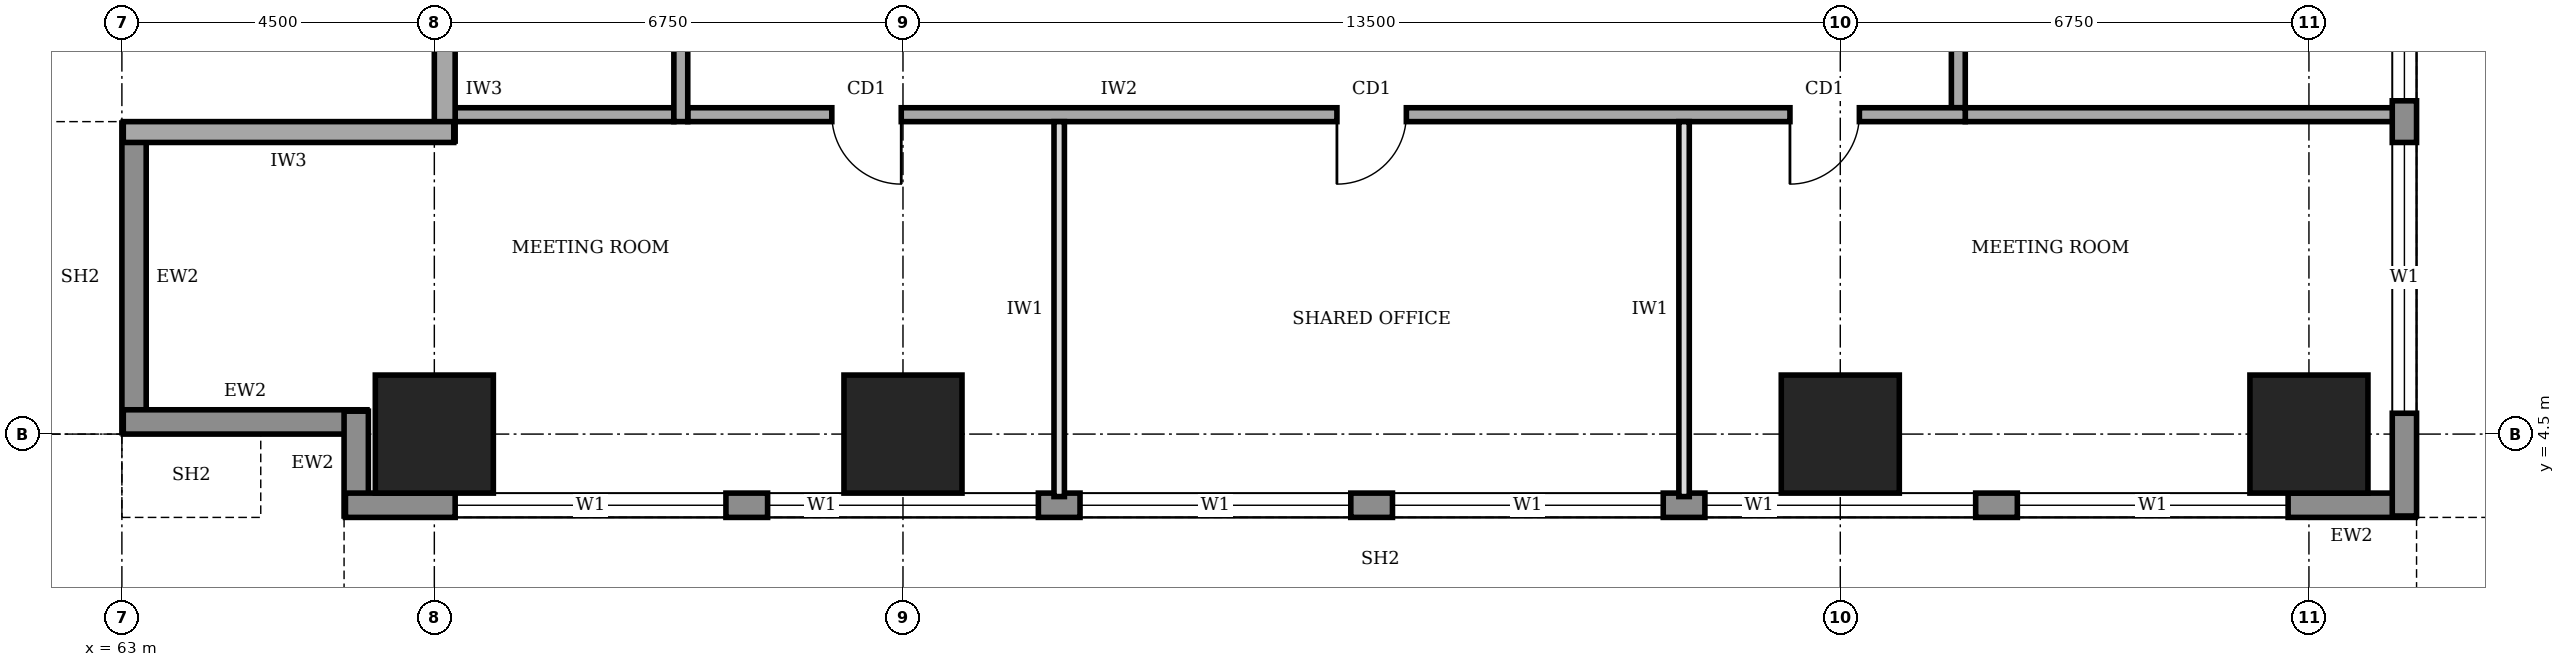
"""IFC4 building model, lengths in metres.
Left out: names, types, materials, properties, quantities, classifications, styles, units other than length and angle.
Written with IfcOpenShell. Run it as: python <this file> out.ifc"""

import sys

from ifc_helpers import new_model, si_unit, direction, frame, frame_2d, origin, origin_2d, place, context, subcontext, project, spatial, rectangle, extrude, element, fill, save


model = new_model("IFC4")
c1 = context("Model", 3, precision=1e-05, world=origin(), true_north=direction((0.0, 1.0)))
c2 = subcontext(c1, "Body", "Model", "MODEL_VIEW")
j1 = project(units=[si_unit("LENGTHUNIT", "METRE"), si_unit("PLANEANGLEUNIT", "RADIAN")], contexts=[c1])
p1 = place(None, origin())
s1 = spatial("IfcSite", under=j1, at=p1, CompositionType="ELEMENT")
p2 = place(p1, origin())
s2 = spatial("IfcBuilding", under=s1, at=p2, CompositionType="ELEMENT")
p3 = place(p2, frame((0.0, 0.0, 121.0)))
s3 = spatial("IfcBuildingStorey", under=s2, at=p3, CompositionType="ELEMENT", Elevation=121.0)
for number, where, z_axis, x_axis in (
    (1, (67.5, 4.5, 0.0), (0.0, 0.0, 1.0), (1.0, 0.0, 0.0)),
    (2, (74.25, 4.5, 0.0), (0.0, 0.0, 1.0), (1.0, 0.0, 0.0)),
    (3, (87.75, 4.5, 0.0), (0.0, 0.0, 1.0), (1.0, 0.0, 0.0)),
    (4, (94.5, 4.5, 0.0), (0.0, 0.0, 1.0), (1.0, 0.0, 0.0)),
):
    element("IfcColumn", number, at=place(p3, frame(where, z_axis=z_axis, x_axis=x_axis)), inside=s3, PredefinedType="COLUMN", context=c2, shape_type="SweptSolid", body=[
        extrude(rectangle(XDim=1.7, YDim=1.7, at=origin_2d()), origin(), (0.0, 0.0, 1.0), 4.0),
    ])
p4 = place(p3, frame((63.175, 8.98, 0.0), z_axis=(0.0, 0.0, 1.0), x_axis=(0.0, -1.0, 0.0)))
e5 = element("IfcWall", 5, at=p4, inside=s3, PredefinedType="STANDARD", context=c2, shape_type="SweptSolid", body=[
    extrude(rectangle(XDim=4.46, YDim=0.35, at=frame_2d((2.23, 0.0))), origin(), (0.0, 0.0, 1.0), 3.75),
])
p5 = place(p3, frame((63.02, 4.675, 0.0), z_axis=(0.0, 0.0, 1.0), x_axis=(1.0, 0.0, 0.0)))
e6 = element("IfcWall", 6, at=p5, inside=s3, PredefinedType="STANDARD", context=c2, shape_type="SweptSolid", body=[
    extrude(rectangle(XDim=3.51, YDim=0.35, at=frame_2d((1.755, 0.0))), origin(), (0.0, 0.0, 1.0), 2.85),
])
p6 = place(p3, frame((66.375, 4.83, 0.0), z_axis=(0.0, 0.0, 1.0), x_axis=(0.0, -1.0, 0.0)))
e7 = element("IfcWall", 7, at=p6, inside=s3, PredefinedType="STANDARD", context=c2, shape_type="SweptSolid", body=[
    extrude(rectangle(XDim=1.51, YDim=0.35, at=frame_2d((0.755, 0.0))), origin(), (0.0, 0.0, 1.0), 3.75),
])
p7 = place(p3, frame((66.22, 3.475, 0.0), z_axis=(0.0, 0.0, 1.0), x_axis=(1.0, 0.0, 0.0)))
e8 = element("IfcWall", 8, at=p7, inside=s3, PredefinedType="STANDARD", context=c2, shape_type="SweptSolid", body=[
    extrude(rectangle(XDim=29.81, YDim=0.35, at=frame_2d((14.905, 0.0))), origin(), (0.0, 0.0, 1.0), 3.75),
])
p8 = place(p7, frame((1.58, 0.0, 0.9)))
e9 = element("IfcOpeningElement", 9, at=p8, cuts=e8, PredefinedType="OPENING", context=c2, shape_type="SweptSolid", body=[
    extrude(rectangle(XDim=3.9, YDim=2.2, at=frame_2d((1.95, 1.1))), frame((0.0, 0.185, 0.0), z_axis=(0.0, -1.0, 0.0), x_axis=(1.0, 0.0, 0.0)), (0.0, 0.0, 1.0), 0.37),
])
p9 = place(p7, frame((6.08, 0.0, 0.9)))
e10 = element("IfcOpeningElement", 10, at=p9, cuts=e8, PredefinedType="OPENING", context=c2, shape_type="SweptSolid", body=[
    extrude(rectangle(XDim=3.9, YDim=2.2, at=frame_2d((1.95, 1.1))), frame((0.0, 0.185, 0.0), z_axis=(0.0, -1.0, 0.0), x_axis=(1.0, 0.0, 0.0)), (0.0, 0.0, 1.0), 0.37),
])
p10 = place(p7, frame((10.58, 0.0, 0.9)))
e11 = element("IfcOpeningElement", 11, at=p10, cuts=e8, PredefinedType="OPENING", context=c2, shape_type="SweptSolid", body=[
    extrude(rectangle(XDim=3.9, YDim=2.2, at=frame_2d((1.95, 1.1))), frame((0.0, 0.185, 0.0), z_axis=(0.0, -1.0, 0.0), x_axis=(1.0, 0.0, 0.0)), (0.0, 0.0, 1.0), 0.37),
])
p11 = place(p7, frame((15.08, 0.0, 0.9)))
e12 = element("IfcOpeningElement", 12, at=p11, cuts=e8, PredefinedType="OPENING", context=c2, shape_type="SweptSolid", body=[
    extrude(rectangle(XDim=3.9, YDim=2.2, at=frame_2d((1.95, 1.1))), frame((0.0, 0.185, 0.0), z_axis=(0.0, -1.0, 0.0), x_axis=(1.0, 0.0, 0.0)), (0.0, 0.0, 1.0), 0.37),
])
p12 = place(p7, frame((19.58, 0.0, 0.9)))
e13 = element("IfcOpeningElement", 13, at=p12, cuts=e8, PredefinedType="OPENING", context=c2, shape_type="SweptSolid", body=[
    extrude(rectangle(XDim=3.9, YDim=2.2, at=frame_2d((1.95, 1.1))), frame((0.0, 0.185, 0.0), z_axis=(0.0, -1.0, 0.0), x_axis=(1.0, 0.0, 0.0)), (0.0, 0.0, 1.0), 0.37),
])
p13 = place(p7, frame((24.08, 0.0, 0.9)))
e14 = element("IfcOpeningElement", 14, at=p13, cuts=e8, PredefinedType="OPENING", context=c2, shape_type="SweptSolid", body=[
    extrude(rectangle(XDim=3.9, YDim=2.2, at=frame_2d((1.95, 1.1))), frame((0.0, 0.185, 0.0), z_axis=(0.0, -1.0, 0.0), x_axis=(1.0, 0.0, 0.0)), (0.0, 0.0, 1.0), 0.37),
])
p14 = place(p3, frame((95.875, 3.32, 0.0), z_axis=(0.0, 0.0, 1.0), x_axis=(0.0, 1.0, 0.0)))
e15 = element("IfcWall", 15, at=p14, inside=s3, PredefinedType="STANDARD", context=c2, shape_type="SweptSolid", body=[
    extrude(rectangle(XDim=33.96, YDim=0.35, at=frame_2d((16.98, 0.0))), origin(), (0.0, 0.0, 1.0), 3.75),
])
p15 = place(p14, frame((1.48, 0.0, 0.9)))
e16 = element("IfcOpeningElement", 16, at=p15, cuts=e15, PredefinedType="OPENING", context=c2, shape_type="SweptSolid", body=[
    extrude(rectangle(XDim=3.9, YDim=2.2, at=frame_2d((1.95, 1.1))), frame((0.0, 0.185, 0.0), z_axis=(0.0, -1.0, 0.0), x_axis=(1.0, 0.0, 0.0)), (0.0, 0.0, 1.0), 0.37),
])
p16 = place(p14, frame((5.98, 0.0, 0.9)))
e17 = element("IfcOpeningElement", 17, at=p16, cuts=e15, PredefinedType="OPENING", context=c2, shape_type="SweptSolid", body=[
    extrude(rectangle(XDim=3.9, YDim=2.2, at=frame_2d((1.95, 1.1))), frame((0.0, 0.185, 0.0), z_axis=(0.0, -1.0, 0.0), x_axis=(1.0, 0.0, 0.0)), (0.0, 0.0, 1.0), 0.37),
])
p17 = place(p14, frame((10.48, 0.0, 0.9)))
e18 = element("IfcOpeningElement", 18, at=p17, cuts=e15, PredefinedType="OPENING", context=c2, shape_type="SweptSolid", body=[
    extrude(rectangle(XDim=3.9, YDim=2.2, at=frame_2d((1.95, 1.1))), frame((0.0, 0.185, 0.0), z_axis=(0.0, -1.0, 0.0), x_axis=(1.0, 0.0, 0.0)), (0.0, 0.0, 1.0), 0.37),
])
p18 = place(p14, frame((14.98, 0.0, 0.9)))
e19 = element("IfcOpeningElement", 19, at=p18, cuts=e15, PredefinedType="OPENING", context=c2, shape_type="SweptSolid", body=[
    extrude(rectangle(XDim=3.9, YDim=2.2, at=frame_2d((1.95, 1.1))), frame((0.0, 0.185, 0.0), z_axis=(0.0, -1.0, 0.0), x_axis=(1.0, 0.0, 0.0)), (0.0, 0.0, 1.0), 0.37),
])
p19 = place(p14, frame((19.48, 0.0, 0.9)))
e20 = element("IfcOpeningElement", 20, at=p19, cuts=e15, PredefinedType="OPENING", context=c2, shape_type="SweptSolid", body=[
    extrude(rectangle(XDim=3.9, YDim=2.2, at=frame_2d((1.95, 1.1))), frame((0.0, 0.185, 0.0), z_axis=(0.0, -1.0, 0.0), x_axis=(1.0, 0.0, 0.0)), (0.0, 0.0, 1.0), 0.37),
])
p20 = place(p14, frame((23.98, 0.0, 0.9)))
e21 = element("IfcOpeningElement", 21, at=p20, cuts=e15, PredefinedType="OPENING", context=c2, shape_type="SweptSolid", body=[
    extrude(rectangle(XDim=3.9, YDim=2.2, at=frame_2d((1.95, 1.1))), frame((0.0, 0.185, 0.0), z_axis=(0.0, -1.0, 0.0), x_axis=(1.0, 0.0, 0.0)), (0.0, 0.0, 1.0), 0.37),
])
p21 = place(p14, frame((28.48, 0.0, 0.9)))
e22 = element("IfcOpeningElement", 22, at=p21, cuts=e15, PredefinedType="OPENING", context=c2, shape_type="SweptSolid", body=[
    extrude(rectangle(XDim=3.9, YDim=2.2, at=frame_2d((1.95, 1.1))), frame((0.0, 0.185, 0.0), z_axis=(0.0, -1.0, 0.0), x_axis=(1.0, 0.0, 0.0)), (0.0, 0.0, 1.0), 0.37),
])
p22 = place(p3, frame((67.65, 10.2, 0.0), z_axis=(0.0, 0.0, 1.0), x_axis=(0.0, -1.0, 0.0)))
e23 = element("IfcWall", 23, at=p22, inside=s3, PredefinedType="SOLIDWALL", context=c2, shape_type="SweptSolid", body=[
    extrude(rectangle(XDim=1.48, YDim=0.3, at=frame_2d((0.74, 0.0))), origin(), (0.0, 0.0, 1.0), 2.65),
])
p23 = place(p3, frame((67.78, 8.85, 0.0), z_axis=(0.0, 0.0, 1.0), x_axis=(-1.0, 0.0, 0.0)))
e24 = element("IfcWall", 24, at=p23, inside=s3, PredefinedType="SOLIDWALL", context=c2, shape_type="SweptSolid", body=[
    extrude(rectangle(XDim=4.76, YDim=0.3, at=frame_2d((2.38, 0.0))), origin(), (0.0, 0.0, 1.0), 3.75),
])
p24 = place(p3, frame((71.15, 9.1, 0.0), z_axis=(0.0, 0.0, 1.0), x_axis=(1.0, 0.0, 0.0)))
e25 = element("IfcWall", 25, at=p24, inside=s3, PredefinedType="SOLIDWALL", context=c2, shape_type="SweptSolid", body=[
    extrude(rectangle(XDim=18.4, YDim=0.2, at=frame_2d((9.2, 0.0))), origin(), (0.0, 0.0, 1.0), 3.75),
])
p25 = place(p24, frame((2.075, 0.0, 0.0)))
e26 = element("IfcOpeningElement", 26, at=p25, cuts=e25, PredefinedType="OPENING", context=c2, shape_type="SweptSolid", body=[
    extrude(rectangle(XDim=1.0, YDim=2.1, at=frame_2d((0.5, 1.05))), frame((0.0, 0.11, 0.0), z_axis=(0.0, -1.0, 0.0), x_axis=(1.0, 0.0, 0.0)), (0.0, 0.0, 1.0), 0.22),
])
p26 = place(p24, frame((9.35, 0.0, 0.0)))
e27 = element("IfcOpeningElement", 27, at=p26, cuts=e25, PredefinedType="OPENING", context=c2, shape_type="SweptSolid", body=[
    extrude(rectangle(XDim=1.0, YDim=2.1, at=frame_2d((0.5, 1.05))), frame((0.0, 0.11, 0.0), z_axis=(0.0, -1.0, 0.0), x_axis=(1.0, 0.0, 0.0)), (0.0, 0.0, 1.0), 0.22),
])
p27 = place(p24, frame((15.875, 0.0, 0.0)))
e28 = element("IfcOpeningElement", 28, at=p27, cuts=e25, PredefinedType="OPENING", context=c2, shape_type="SweptSolid", body=[
    extrude(rectangle(XDim=1.0, YDim=2.1, at=frame_2d((0.5, 1.05))), frame((0.0, 0.11, 0.0), z_axis=(0.0, -1.0, 0.0), x_axis=(1.0, 0.0, 0.0)), (0.0, 0.0, 1.0), 0.22),
])
p28 = place(p3, frame((89.45, 9.2, 0.0), z_axis=(0.0, 0.0, 1.0), x_axis=(0.0, 1.0, 0.0)))
e29 = element("IfcWall", 29, at=p28, inside=s3, PredefinedType="SOLIDWALL", context=c2, shape_type="SweptSolid", body=[
    extrude(rectangle(XDim=22.3, YDim=0.2, at=frame_2d((11.15, 0.0))), origin(), (0.0, 0.0, 1.0), 3.75),
])
p29 = place(p28, frame((1.625, 0.0, 0.0)))
e30 = element("IfcOpeningElement", 30, at=p29, cuts=e29, PredefinedType="OPENING", context=c2, shape_type="SweptSolid", body=[
    extrude(rectangle(XDim=1.0, YDim=2.1, at=frame_2d((0.5, 1.05))), frame((0.0, 0.11, 0.0), z_axis=(0.0, -1.0, 0.0), x_axis=(1.0, 0.0, 0.0)), (0.0, 0.0, 1.0), 0.22),
])
p30 = place(p28, frame((5.05, 0.0, 0.0)))
e31 = element("IfcOpeningElement", 31, at=p30, cuts=e29, PredefinedType="OPENING", context=c2, shape_type="SweptSolid", body=[
    extrude(rectangle(XDim=1.0, YDim=2.1, at=frame_2d((0.5, 1.05))), frame((0.0, 0.11, 0.0), z_axis=(0.0, -1.0, 0.0), x_axis=(1.0, 0.0, 0.0)), (0.0, 0.0, 1.0), 0.22),
])
p31 = place(p28, frame((8.075, 0.0, 0.0)))
e32 = element("IfcOpeningElement", 32, at=p31, cuts=e29, PredefinedType="OPENING", context=c2, shape_type="SweptSolid", body=[
    extrude(rectangle(XDim=0.9, YDim=2.1, at=frame_2d((0.45, 1.05))), frame((0.0, 0.11, 0.0), z_axis=(0.0, -1.0, 0.0), x_axis=(1.0, 0.0, 0.0)), (0.0, 0.0, 1.0), 0.22),
])
p32 = place(p28, frame((11.05, 0.0, 0.0)))
e33 = element("IfcOpeningElement", 33, at=p32, cuts=e29, PredefinedType="OPENING", context=c2, shape_type="SweptSolid", body=[
    extrude(rectangle(XDim=0.9, YDim=2.1, at=frame_2d((0.45, 1.05))), frame((0.0, 0.11, 0.0), z_axis=(0.0, -1.0, 0.0), x_axis=(1.0, 0.0, 0.0)), (0.0, 0.0, 1.0), 0.22),
])
p33 = place(p28, frame((15.675, 0.0, 0.0)))
e34 = element("IfcOpeningElement", 34, at=p33, cuts=e29, PredefinedType="OPENING", context=c2, shape_type="SweptSolid", body=[
    extrude(rectangle(XDim=0.9, YDim=2.1, at=frame_2d((0.45, 1.05))), frame((0.0, 0.11, 0.0), z_axis=(0.0, -1.0, 0.0), x_axis=(1.0, 0.0, 0.0)), (0.0, 0.0, 1.0), 0.22),
])
p34 = place(p28, frame((13.1, 0.0, 0.0)))
e35 = element("IfcOpeningElement", 35, at=p34, cuts=e29, PredefinedType="OPENING", context=c2, shape_type="SweptSolid", body=[
    extrude(rectangle(XDim=1.0, YDim=2.1, at=frame_2d((0.5, 1.05))), frame((0.0, 0.11, 0.0), z_axis=(0.0, -1.0, 0.0), x_axis=(1.0, 0.0, 0.0)), (0.0, 0.0, 1.0), 0.22),
])
p35 = place(p28, frame((19.475, 0.0, 0.0)))
e36 = element("IfcOpeningElement", 36, at=p35, cuts=e29, PredefinedType="OPENING", context=c2, shape_type="SweptSolid", body=[
    extrude(rectangle(XDim=1.0, YDim=2.1, at=frame_2d((0.5, 1.05))), frame((0.0, 0.11, 0.0), z_axis=(0.0, -1.0, 0.0), x_axis=(1.0, 0.0, 0.0)), (0.0, 0.0, 1.0), 0.22),
])
p36 = place(p3, frame((71.05, 31.3, 0.0), z_axis=(0.0, 0.0, 1.0), x_axis=(0.0, -1.0, 0.0)))
e37 = element("IfcWall", 37, at=p36, inside=s3, PredefinedType="SOLIDWALL", context=c2, shape_type="SweptSolid", body=[
    extrude(rectangle(XDim=22.3, YDim=0.2, at=frame_2d((11.15, 0.0))), origin(), (0.0, 0.0, 1.0), 3.75),
])
p37 = place(p36, frame((10.15, 0.0, 0.0)))
e38 = element("IfcOpeningElement", 38, at=p37, cuts=e37, PredefinedType="OPENING", context=c2, shape_type="SweptSolid", body=[
    extrude(rectangle(XDim=1.8, YDim=2.1, at=frame_2d((0.9, 1.05))), frame((0.0, 0.11, 0.0), z_axis=(0.0, -1.0, 0.0), x_axis=(1.0, 0.0, 0.0)), (0.0, 0.0, 1.0), 0.22),
])
p38 = place(p3, frame((67.8, 9.1, 0.0), z_axis=(0.0, 0.0, 1.0), x_axis=(1.0, 0.0, 0.0)))
e39 = element("IfcWall", 39, at=p38, inside=s3, PredefinedType="SOLIDWALL", context=c2, shape_type="SweptSolid", body=[
    extrude(rectangle(XDim=3.15, YDim=0.2, at=frame_2d((1.575, 0.0))), origin(), (0.0, 0.0, 1.0), 3.75),
])
p39 = place(p3, frame((89.55, 9.1, 0.0), z_axis=(0.0, 0.0, 1.0), x_axis=(1.0, 0.0, 0.0)))
e40 = element("IfcWall", 40, at=p39, inside=s3, PredefinedType="SOLIDWALL", context=c2, shape_type="SweptSolid", body=[
    extrude(rectangle(XDim=6.2, YDim=0.2, at=frame_2d((3.1, 0.0))), origin(), (0.0, 0.0, 1.0), 3.75),
])
for number, where, z_axis, x_axis in (
    (41, (76.5, 3.6, 0.0), (0.0, 0.0, 1.0), (0.0, 1.0, 0.0)),
    (42, (85.5, 3.6, 0.0), (0.0, 0.0, 1.0), (0.0, 1.0, 0.0)),
):
    element("IfcWall", number, at=place(p3, frame(where, z_axis=z_axis, x_axis=x_axis)), inside=s3, PredefinedType="PARTITIONING", context=c2, shape_type="SweptSolid", body=[
        extrude(rectangle(XDim=5.4, YDim=0.15, at=frame_2d((2.7, 0.0))), origin(), (0.0, 0.0, 1.0), 3.75),
    ])
p40 = place(p8, origin())
e43 = element("IfcWindow", 43, at=p40, inside=s3, PartitioningType="SINGLE_PANEL", PredefinedType="WINDOW", context=c2, shape_type="SweptSolid", body=[
    extrude(rectangle(XDim=3.9, YDim=2.2, at=frame_2d((1.95, 1.1))), frame((0.0, 0.03, 0.0), z_axis=(0.0, -1.0, 0.0), x_axis=(1.0, 0.0, 0.0)), (0.0, 0.0, 1.0), 0.06),
])
fill(e9, e43)
p41 = place(p9, origin())
e44 = element("IfcWindow", 44, at=p41, inside=s3, PartitioningType="SINGLE_PANEL", PredefinedType="WINDOW", context=c2, shape_type="SweptSolid", body=[
    extrude(rectangle(XDim=3.9, YDim=2.2, at=frame_2d((1.95, 1.1))), frame((0.0, 0.03, 0.0), z_axis=(0.0, -1.0, 0.0), x_axis=(1.0, 0.0, 0.0)), (0.0, 0.0, 1.0), 0.06),
])
fill(e10, e44)
p42 = place(p10, origin())
e45 = element("IfcWindow", 45, at=p42, inside=s3, PartitioningType="SINGLE_PANEL", PredefinedType="WINDOW", context=c2, shape_type="SweptSolid", body=[
    extrude(rectangle(XDim=3.9, YDim=2.2, at=frame_2d((1.95, 1.1))), frame((0.0, 0.03, 0.0), z_axis=(0.0, -1.0, 0.0), x_axis=(1.0, 0.0, 0.0)), (0.0, 0.0, 1.0), 0.06),
])
fill(e11, e45)
p43 = place(p11, origin())
e46 = element("IfcWindow", 46, at=p43, inside=s3, PartitioningType="SINGLE_PANEL", PredefinedType="WINDOW", context=c2, shape_type="SweptSolid", body=[
    extrude(rectangle(XDim=3.9, YDim=2.2, at=frame_2d((1.95, 1.1))), frame((0.0, 0.03, 0.0), z_axis=(0.0, -1.0, 0.0), x_axis=(1.0, 0.0, 0.0)), (0.0, 0.0, 1.0), 0.06),
])
fill(e12, e46)
p44 = place(p12, origin())
e47 = element("IfcWindow", 47, at=p44, inside=s3, PartitioningType="SINGLE_PANEL", PredefinedType="WINDOW", context=c2, shape_type="SweptSolid", body=[
    extrude(rectangle(XDim=3.9, YDim=2.2, at=frame_2d((1.95, 1.1))), frame((0.0, 0.03, 0.0), z_axis=(0.0, -1.0, 0.0), x_axis=(1.0, 0.0, 0.0)), (0.0, 0.0, 1.0), 0.06),
])
fill(e13, e47)
p45 = place(p13, origin())
e48 = element("IfcWindow", 48, at=p45, inside=s3, PartitioningType="SINGLE_PANEL", PredefinedType="WINDOW", context=c2, shape_type="SweptSolid", body=[
    extrude(rectangle(XDim=3.9, YDim=2.2, at=frame_2d((1.95, 1.1))), frame((0.0, 0.03, 0.0), z_axis=(0.0, -1.0, 0.0), x_axis=(1.0, 0.0, 0.0)), (0.0, 0.0, 1.0), 0.06),
])
fill(e14, e48)
p46 = place(p15, origin())
e49 = element("IfcWindow", 49, at=p46, inside=s3, PartitioningType="SINGLE_PANEL", PredefinedType="WINDOW", context=c2, shape_type="SweptSolid", body=[
    extrude(rectangle(XDim=3.9, YDim=2.2, at=frame_2d((1.95, 1.1))), frame((0.0, 0.03, 0.0), z_axis=(0.0, -1.0, 0.0), x_axis=(1.0, 0.0, 0.0)), (0.0, 0.0, 1.0), 0.06),
])
fill(e16, e49)
p47 = place(p16, origin())
e50 = element("IfcWindow", 50, at=p47, inside=s3, PartitioningType="SINGLE_PANEL", PredefinedType="WINDOW", context=c2, shape_type="SweptSolid", body=[
    extrude(rectangle(XDim=3.9, YDim=2.2, at=frame_2d((1.95, 1.1))), frame((0.0, 0.03, 0.0), z_axis=(0.0, -1.0, 0.0), x_axis=(1.0, 0.0, 0.0)), (0.0, 0.0, 1.0), 0.06),
])
fill(e17, e50)
p48 = place(p25, frame((1.0, 0.0, 0.0), z_axis=(0.0, 0.0, 1.0), x_axis=(-1.0, 0.0, 0.0)))
e51 = element("IfcDoor", 51, at=p48, inside=s3, OperationType="SINGLE_SWING_LEFT", PredefinedType="DOOR", context=c2, shape_type="SweptSolid", body=[
    extrude(rectangle(XDim=1.0, YDim=2.1, at=frame_2d((0.5, 1.05))), frame((0.0, 0.025, 0.0), z_axis=(0.0, -1.0, 0.0), x_axis=(1.0, 0.0, 0.0)), (0.0, 0.0, 1.0), 0.05),
])
fill(e26, e51)
p49 = place(p26, frame((1.0, 0.0, 0.0), z_axis=(0.0, 0.0, 1.0), x_axis=(-1.0, 0.0, 0.0)))
e52 = element("IfcDoor", 52, at=p49, inside=s3, OperationType="SINGLE_SWING_RIGHT", PredefinedType="DOOR", context=c2, shape_type="SweptSolid", body=[
    extrude(rectangle(XDim=1.0, YDim=2.1, at=frame_2d((0.5, 1.05))), frame((0.0, 0.025, 0.0), z_axis=(0.0, -1.0, 0.0), x_axis=(1.0, 0.0, 0.0)), (0.0, 0.0, 1.0), 0.05),
])
fill(e27, e52)
p50 = place(p27, frame((1.0, 0.0, 0.0), z_axis=(0.0, 0.0, 1.0), x_axis=(-1.0, 0.0, 0.0)))
e53 = element("IfcDoor", 53, at=p50, inside=s3, OperationType="SINGLE_SWING_RIGHT", PredefinedType="DOOR", context=c2, shape_type="SweptSolid", body=[
    extrude(rectangle(XDim=1.0, YDim=2.1, at=frame_2d((0.5, 1.05))), frame((0.0, 0.025, 0.0), z_axis=(0.0, -1.0, 0.0), x_axis=(1.0, 0.0, 0.0)), (0.0, 0.0, 1.0), 0.05),
])
fill(e28, e53)
save(model, sys.argv[1])
